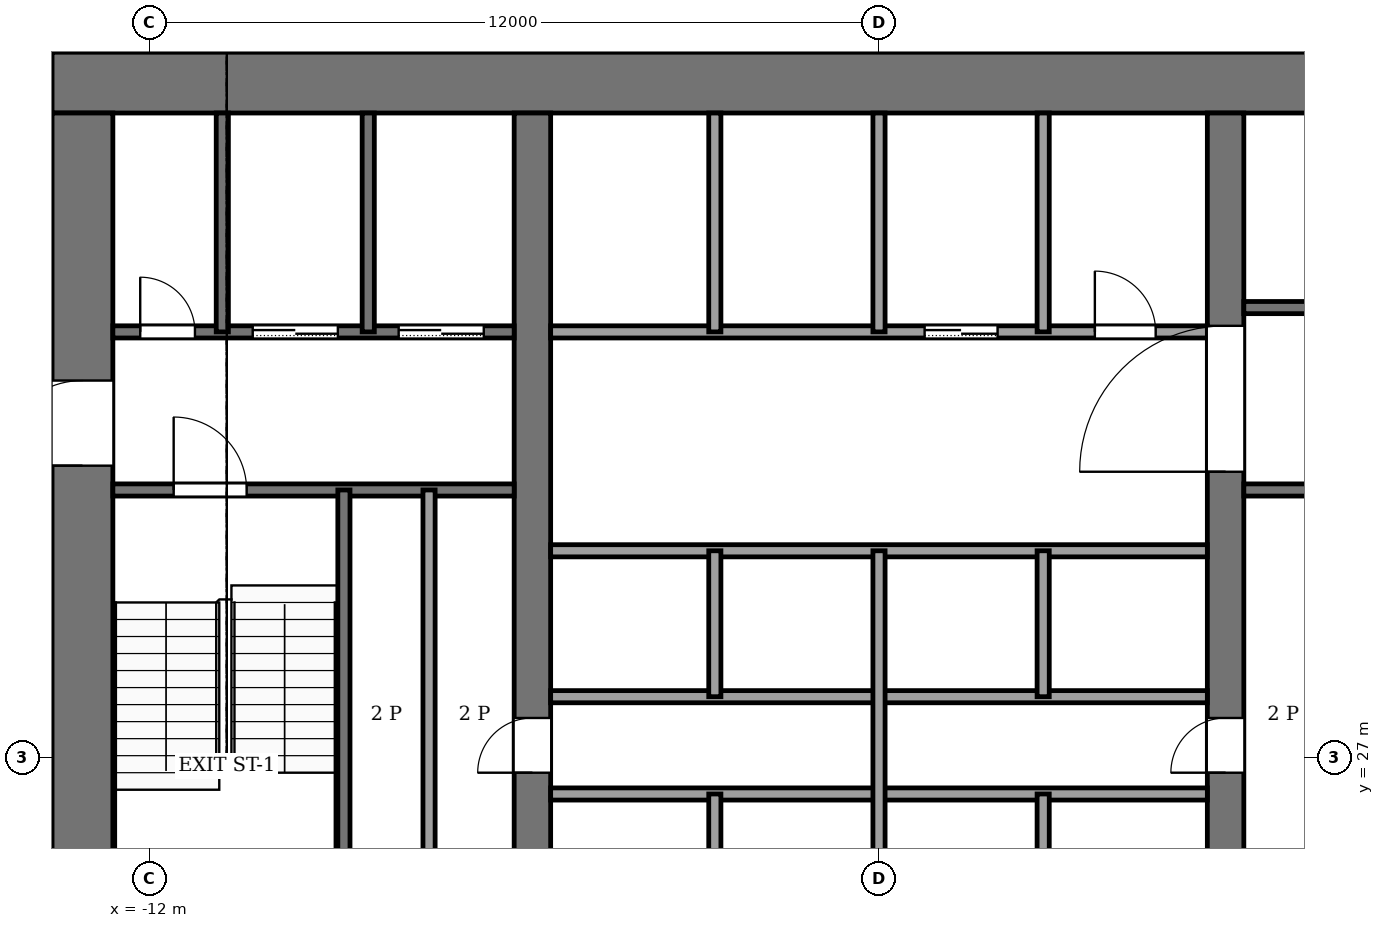
"""IFC4 building model, lengths in metres.
Left out: names, types, materials, properties, quantities, classifications, styles, units other than length and angle.
Written with IfcOpenShell. Run it as: python <this file> out.ifc"""

import sys

from ifc_helpers import new_model, si_unit, direction, frame, frame_2d, origin, place, context, subcontext, project, spatial, rectangle, extrude, element, fill, save


model = new_model("IFC4")
c1 = context("Model", 3, precision=1e-05, world=origin(), true_north=direction((0.0, 1.0)))
c2 = subcontext(c1, "Body", "Model", "MODEL_VIEW")
j1 = project(units=[si_unit("LENGTHUNIT", "METRE"), si_unit("PLANEANGLEUNIT", "RADIAN")], contexts=[c1])
p1 = place(None, origin())
s1 = spatial("IfcSite", under=j1, at=p1, CompositionType="ELEMENT")
p2 = place(p1, origin())
s2 = spatial("IfcBuilding", under=s1, at=p2, CompositionType="ELEMENT")
p3 = place(p2, frame((0.0, 0.0, 146.0)))
s3 = spatial("IfcBuildingStorey", under=s2, at=p3, CompositionType="ELEMENT", Elevation=146.0)
p4 = place(p3, frame((-13.6, 38.1, -0.13), z_axis=(0.0, 0.0, 1.0), x_axis=(1.0, 0.0, 0.0)))
e1 = element("IfcWall", 1, at=p4, inside=s3, PredefinedType="SHEAR", context=c2, shape_type="SweptSolid", body=[
    extrude(rectangle(XDim=27.2, YDim=1.0, at=frame_2d((13.6, 0.0))), origin(), (0.0, 0.0, 1.0), 4.0),
])
p5 = place(p3, frame((-13.1, 18.4, -0.13), z_axis=(0.0, 0.0, 1.0), x_axis=(0.0, 1.0, 0.0)))
e2 = element("IfcWall", 2, at=p5, inside=s3, PredefinedType="SHEAR", context=c2, shape_type="SweptSolid", body=[
    extrude(rectangle(XDim=19.2, YDim=1.0, at=frame_2d((9.6, 0.0))), origin(), (0.0, 0.0, 1.0), 4.0),
])
p6 = place(p5, frame((2.8, 0.0, 0.13)))
e3 = element("IfcOpeningElement", 3, at=p6, cuts=e2, PredefinedType="OPENING", context=c2, shape_type="SweptSolid", body=[
    extrude(rectangle(XDim=2.4, YDim=2.4, at=frame_2d((1.2, 1.2))), frame((0.0, 0.51, 0.0), z_axis=(0.0, -1.0, 0.0), x_axis=(1.0, 0.0, 0.0)), (0.0, 0.0, 1.0), 1.02),
])
p7 = place(p5, frame((13.4, 0.0, 0.13)))
e4 = element("IfcOpeningElement", 4, at=p7, cuts=e2, PredefinedType="OPENING", context=c2, shape_type="SweptSolid", body=[
    extrude(rectangle(XDim=1.4, YDim=2.2, at=frame_2d((0.7, 1.1))), frame((0.0, 0.51, 0.0), z_axis=(0.0, -1.0, 0.0), x_axis=(1.0, 0.0, 0.0)), (0.0, 0.0, 1.0), 1.02),
])
p8 = place(p3, frame((-5.7, 18.4, -0.13), z_axis=(0.0, 0.0, 1.0), x_axis=(0.0, 1.0, 0.0)))
e5 = element("IfcWall", 5, at=p8, inside=s3, PredefinedType="SHEAR", context=c2, shape_type="SweptSolid", body=[
    extrude(rectangle(XDim=19.2, YDim=0.6, at=frame_2d((9.6, 0.0))), origin(), (0.0, 0.0, 1.0), 4.0),
])
p9 = place(p8, frame((8.35, 0.0, 0.13)))
e6 = element("IfcOpeningElement", 6, at=p9, cuts=e5, PredefinedType="OPENING", context=c2, shape_type="SweptSolid", body=[
    extrude(rectangle(XDim=0.9, YDim=2.1, at=frame_2d((0.45, 1.05))), frame((0.0, 0.31, 0.0), z_axis=(0.0, -1.0, 0.0), x_axis=(1.0, 0.0, 0.0)), (0.0, 0.0, 1.0), 0.62),
])
p10 = place(p3, frame((5.7, 18.4, -0.13), z_axis=(0.0, 0.0, 1.0), x_axis=(0.0, 1.0, 0.0)))
e7 = element("IfcWall", 7, at=p10, inside=s3, PredefinedType="SHEAR", context=c2, shape_type="SweptSolid", body=[
    extrude(rectangle(XDim=19.2, YDim=0.6, at=frame_2d((9.6, 0.0))), origin(), (0.0, 0.0, 1.0), 4.0),
])
p11 = place(p10, frame((8.35, 0.0, 0.13)))
e8 = element("IfcOpeningElement", 8, at=p11, cuts=e7, PredefinedType="OPENING", context=c2, shape_type="SweptSolid", body=[
    extrude(rectangle(XDim=0.9, YDim=2.1, at=frame_2d((0.45, 1.05))), frame((0.0, 0.31, 0.0), z_axis=(0.0, -1.0, 0.0), x_axis=(1.0, 0.0, 0.0)), (0.0, 0.0, 1.0), 0.62),
])
p12 = place(p10, frame((13.3, 0.0, 0.13)))
e9 = element("IfcOpeningElement", 9, at=p12, cuts=e7, PredefinedType="OPENING", context=c2, shape_type="SweptSolid", body=[
    extrude(rectangle(XDim=2.4, YDim=2.4, at=frame_2d((1.2, 1.2))), frame((0.0, 0.31, 0.0), z_axis=(0.0, -1.0, 0.0), x_axis=(1.0, 0.0, 0.0)), (0.0, 0.0, 1.0), 0.62),
])
for number, where, z_axis, x_axis in (
    (10, (-5.4, 26.4, 0.0), (0.0, 0.0, 1.0), (1.0, 0.0, 0.0)),
    (11, (-5.4, 28.0, 0.0), (0.0, 0.0, 1.0), (1.0, 0.0, 0.0)),
    (12, (-5.4, 30.4, 0.0), (0.0, 0.0, 1.0), (1.0, 0.0, 0.0)),
):
    element("IfcWall", number, at=place(p3, frame(where, z_axis=z_axis, x_axis=x_axis)), inside=s3, PredefinedType="PARTITIONING", context=c2, shape_type="SweptSolid", body=[
        extrude(rectangle(XDim=10.8, YDim=0.2, at=frame_2d((5.4, 0.0))), origin(), (0.0, 0.0, 1.0), 3.87),
    ])
p13 = place(p3, frame((-12.6, 31.4, 0.0), z_axis=(0.0, 0.0, 1.0), x_axis=(1.0, 0.0, 0.0)))
e13 = element("IfcWall", 13, at=p13, inside=s3, PredefinedType="PARTITIONING", context=c2, shape_type="SweptSolid", body=[
    extrude(rectangle(XDim=6.6, YDim=0.2, at=frame_2d((3.3, 0.0))), origin(), (0.0, 0.0, 1.0), 3.87),
])
p14 = place(p13, frame((1.0, 0.0, 0.0)))
e14 = element("IfcOpeningElement", 14, at=p14, cuts=e13, PredefinedType="OPENING", context=c2, shape_type="SweptSolid", body=[
    extrude(rectangle(XDim=1.2, YDim=2.2, at=frame_2d((0.6, 1.1))), frame((0.0, 0.11, 0.0), z_axis=(0.0, -1.0, 0.0), x_axis=(1.0, 0.0, 0.0)), (0.0, 0.0, 1.0), 0.22),
])
p15 = place(p3, frame((6.0, 31.4, 0.0), z_axis=(0.0, 0.0, 1.0), x_axis=(1.0, 0.0, 0.0)))
e15 = element("IfcWall", 15, at=p15, inside=s3, PredefinedType="PARTITIONING", context=c2, shape_type="SweptSolid", body=[
    extrude(rectangle(XDim=6.6, YDim=0.2, at=frame_2d((3.3, 0.0))), origin(), (0.0, 0.0, 1.0), 3.87),
])
p16 = place(p3, frame((-12.6, 34.0, 0.0), z_axis=(0.0, 0.0, 1.0), x_axis=(1.0, 0.0, 0.0)))
e16 = element("IfcWall", 16, at=p16, inside=s3, PredefinedType="PARTITIONING", context=c2, shape_type="SweptSolid", body=[
    extrude(rectangle(XDim=6.6, YDim=0.2, at=frame_2d((3.3, 0.0))), origin(), (0.0, 0.0, 1.0), 3.87),
])
p17 = place(p16, frame((4.7, 0.0, 0.0)))
e17 = element("IfcOpeningElement", 17, at=p17, cuts=e16, PredefinedType="OPENING", context=c2, shape_type="SweptSolid", body=[
    extrude(rectangle(XDim=1.4, YDim=2.2, at=frame_2d((0.7, 1.1))), frame((0.0, 0.11, 0.0), z_axis=(0.0, -1.0, 0.0), x_axis=(1.0, 0.0, 0.0)), (0.0, 0.0, 1.0), 0.22),
])
p18 = place(p16, frame((2.3, 0.0, 0.0)))
e18 = element("IfcOpeningElement", 18, at=p18, cuts=e16, PredefinedType="OPENING", context=c2, shape_type="SweptSolid", body=[
    extrude(rectangle(XDim=1.4, YDim=2.2, at=frame_2d((0.7, 1.1))), frame((0.0, 0.11, 0.0), z_axis=(0.0, -1.0, 0.0), x_axis=(1.0, 0.0, 0.0)), (0.0, 0.0, 1.0), 0.22),
])
p19 = place(p16, frame((0.45, 0.0, 0.0)))
e19 = element("IfcOpeningElement", 19, at=p19, cuts=e16, PredefinedType="OPENING", context=c2, shape_type="SweptSolid", body=[
    extrude(rectangle(XDim=0.9, YDim=2.1, at=frame_2d((0.45, 1.05))), frame((0.0, 0.11, 0.0), z_axis=(0.0, -1.0, 0.0), x_axis=(1.0, 0.0, 0.0)), (0.0, 0.0, 1.0), 0.22),
])
p20 = place(p3, frame((-5.4, 34.0, 0.0), z_axis=(0.0, 0.0, 1.0), x_axis=(1.0, 0.0, 0.0)))
e20 = element("IfcWall", 20, at=p20, inside=s3, PredefinedType="PARTITIONING", context=c2, shape_type="SweptSolid", body=[
    extrude(rectangle(XDim=10.8, YDim=0.2, at=frame_2d((5.4, 0.0))), origin(), (0.0, 0.0, 1.0), 3.87),
])
p21 = place(p20, frame((6.15, 0.0, 0.0)))
e21 = element("IfcOpeningElement", 21, at=p21, cuts=e20, PredefinedType="OPENING", context=c2, shape_type="SweptSolid", body=[
    extrude(rectangle(XDim=1.2, YDim=2.2, at=frame_2d((0.6, 1.1))), frame((0.0, 0.11, 0.0), z_axis=(0.0, -1.0, 0.0), x_axis=(1.0, 0.0, 0.0)), (0.0, 0.0, 1.0), 0.22),
])
p22 = place(p20, frame((8.95, 0.0, 0.0)))
e22 = element("IfcOpeningElement", 22, at=p22, cuts=e20, PredefinedType="OPENING", context=c2, shape_type="SweptSolid", body=[
    extrude(rectangle(XDim=1.0, YDim=2.1, at=frame_2d((0.5, 1.05))), frame((0.0, 0.11, 0.0), z_axis=(0.0, -1.0, 0.0), x_axis=(1.0, 0.0, 0.0)), (0.0, 0.0, 1.0), 0.22),
])
p23 = place(p3, frame((6.0, 34.4, 0.0), z_axis=(0.0, 0.0, 1.0), x_axis=(1.0, 0.0, 0.0)))
e23 = element("IfcWall", 23, at=p23, inside=s3, PredefinedType="PARTITIONING", context=c2, shape_type="SweptSolid", body=[
    extrude(rectangle(XDim=6.6, YDim=0.2, at=frame_2d((3.3, 0.0))), origin(), (0.0, 0.0, 1.0), 3.87),
])
p24 = place(p23, frame((4.8, 0.0, 0.0)))
e24 = element("IfcOpeningElement", 24, at=p24, cuts=e23, PredefinedType="OPENING", context=c2, shape_type="SweptSolid", body=[
    extrude(rectangle(XDim=1.2, YDim=2.2, at=frame_2d((0.6, 1.1))), frame((0.0, 0.11, 0.0), z_axis=(0.0, -1.0, 0.0), x_axis=(1.0, 0.0, 0.0)), (0.0, 0.0, 1.0), 0.22),
])
p25 = place(p3, frame((-10.8, 34.0, 0.0), z_axis=(0.0, 0.0, 1.0), x_axis=(0.0, 1.0, 0.0)))
e25 = element("IfcWall", 25, at=p25, inside=s3, PredefinedType="PARTITIONING", context=c2, shape_type="SweptSolid", body=[
    extrude(rectangle(XDim=3.6, YDim=0.2, at=frame_2d((1.8, 0.0))), origin(), (0.0, 0.0, 1.0), 3.87),
])
p26 = place(p3, frame((-8.8, 24.0, 0.0), z_axis=(0.0, 0.0, 1.0), x_axis=(0.0, 1.0, 0.0)))
e26 = element("IfcWall", 26, at=p26, inside=s3, PredefinedType="PARTITIONING", context=c2, shape_type="SweptSolid", body=[
    extrude(rectangle(XDim=7.4, YDim=0.2, at=frame_2d((3.7, 0.0))), origin(), (0.0, 0.0, 1.0), 3.87),
])
p27 = place(p3, frame((-8.4, 34.0, 0.0), z_axis=(0.0, 0.0, 1.0), x_axis=(0.0, 1.0, 0.0)))
e27 = element("IfcWall", 27, at=p27, inside=s3, PredefinedType="PARTITIONING", context=c2, shape_type="SweptSolid", body=[
    extrude(rectangle(XDim=3.6, YDim=0.2, at=frame_2d((1.8, 0.0))), origin(), (0.0, 0.0, 1.0), 3.87),
])
p28 = place(p3, frame((-7.4, 24.0, 0.0), z_axis=(0.0, 0.0, 1.0), x_axis=(0.0, 1.0, 0.0)))
e28 = element("IfcWall", 28, at=p28, inside=s3, PredefinedType="PARTITIONING", context=c2, shape_type="SweptSolid", body=[
    extrude(rectangle(XDim=7.4, YDim=0.2, at=frame_2d((3.7, 0.0))), origin(), (0.0, 0.0, 1.0), 3.87),
])
for number, where, z_axis, x_axis in (
    (29, (-2.7, 24.0, 0.0), (0.0, 0.0, 1.0), (0.0, 1.0, 0.0)),
    (30, (-2.7, 28.0, 0.0), (0.0, 0.0, 1.0), (0.0, 1.0, 0.0)),
):
    element("IfcWall", number, at=place(p3, frame(where, z_axis=z_axis, x_axis=x_axis)), inside=s3, PredefinedType="PARTITIONING", context=c2, shape_type="SweptSolid", body=[
        extrude(rectangle(XDim=2.4, YDim=0.2, at=frame_2d((1.2, 0.0))), origin(), (0.0, 0.0, 1.0), 3.87),
    ])
p29 = place(p3, frame((-2.7, 34.0, 0.0), z_axis=(0.0, 0.0, 1.0), x_axis=(0.0, 1.0, 0.0)))
e31 = element("IfcWall", 31, at=p29, inside=s3, PredefinedType="PARTITIONING", context=c2, shape_type="SweptSolid", body=[
    extrude(rectangle(XDim=3.6, YDim=0.2, at=frame_2d((1.8, 0.0))), origin(), (0.0, 0.0, 1.0), 3.87),
])
p30 = place(p3, frame((0.0, 24.0, 0.0), z_axis=(0.0, 0.0, 1.0), x_axis=(0.0, 1.0, 0.0)))
e32 = element("IfcWall", 32, at=p30, inside=s3, PredefinedType="PARTITIONING", context=c2, shape_type="SweptSolid", body=[
    extrude(rectangle(XDim=6.4, YDim=0.2, at=frame_2d((3.2, 0.0))), origin(), (0.0, 0.0, 1.0), 3.87),
])
p31 = place(p3, frame((0.0, 34.0, 0.0), z_axis=(0.0, 0.0, 1.0), x_axis=(0.0, 1.0, 0.0)))
e33 = element("IfcWall", 33, at=p31, inside=s3, PredefinedType="PARTITIONING", context=c2, shape_type="SweptSolid", body=[
    extrude(rectangle(XDim=3.6, YDim=0.2, at=frame_2d((1.8, 0.0))), origin(), (0.0, 0.0, 1.0), 3.87),
])
for number, where, z_axis, x_axis in (
    (34, (2.7, 24.0, 0.0), (0.0, 0.0, 1.0), (0.0, 1.0, 0.0)),
    (35, (2.7, 28.0, 0.0), (0.0, 0.0, 1.0), (0.0, 1.0, 0.0)),
):
    element("IfcWall", number, at=place(p3, frame(where, z_axis=z_axis, x_axis=x_axis)), inside=s3, PredefinedType="PARTITIONING", context=c2, shape_type="SweptSolid", body=[
        extrude(rectangle(XDim=2.4, YDim=0.2, at=frame_2d((1.2, 0.0))), origin(), (0.0, 0.0, 1.0), 3.87),
    ])
p32 = place(p3, frame((2.7, 34.0, 0.0), z_axis=(0.0, 0.0, 1.0), x_axis=(0.0, 1.0, 0.0)))
e36 = element("IfcWall", 36, at=p32, inside=s3, PredefinedType="PARTITIONING", context=c2, shape_type="SweptSolid", body=[
    extrude(rectangle(XDim=3.6, YDim=0.2, at=frame_2d((1.8, 0.0))), origin(), (0.0, 0.0, 1.0), 3.87),
])
p33 = place(p21, origin())
e37 = element("IfcDoor", 37, at=p33, inside=s3, OperationType="SLIDING_TO_LEFT", PredefinedType="DOOR", context=c2, shape_type="SweptSolid", body=[
    extrude(rectangle(XDim=1.2, YDim=2.2, at=frame_2d((0.6, 1.1))), frame((0.0, 0.025, 0.0), z_axis=(0.0, -1.0, 0.0), x_axis=(1.0, 0.0, 0.0)), (0.0, 0.0, 1.0), 0.05),
])
fill(e21, e37)
p34 = place(p17, origin())
e38 = element("IfcDoor", 38, at=p34, inside=s3, OperationType="SLIDING_TO_LEFT", PredefinedType="DOOR", context=c2, shape_type="SweptSolid", body=[
    extrude(rectangle(XDim=1.4, YDim=2.2, at=frame_2d((0.7, 1.1))), frame((0.0, 0.025, 0.0), z_axis=(0.0, -1.0, 0.0), x_axis=(1.0, 0.0, 0.0)), (0.0, 0.0, 1.0), 0.05),
])
fill(e17, e38)
p35 = place(p18, origin())
e39 = element("IfcDoor", 39, at=p35, inside=s3, OperationType="SLIDING_TO_LEFT", PredefinedType="DOOR", context=c2, shape_type="SweptSolid", body=[
    extrude(rectangle(XDim=1.4, YDim=2.2, at=frame_2d((0.7, 1.1))), frame((0.0, 0.025, 0.0), z_axis=(0.0, -1.0, 0.0), x_axis=(1.0, 0.0, 0.0)), (0.0, 0.0, 1.0), 0.05),
])
fill(e18, e39)
p36 = place(p19, origin())
e40 = element("IfcDoor", 40, at=p36, inside=s3, OperationType="SINGLE_SWING_RIGHT", PredefinedType="DOOR", context=c2, shape_type="SweptSolid", body=[
    extrude(rectangle(XDim=0.9, YDim=2.1, at=frame_2d((0.45, 1.05))), frame((0.0, 0.025, 0.0), z_axis=(0.0, -1.0, 0.0), x_axis=(1.0, 0.0, 0.0)), (0.0, 0.0, 1.0), 0.05),
])
fill(e19, e40)
p37 = place(p22, origin())
e41 = element("IfcDoor", 41, at=p37, inside=s3, OperationType="SINGLE_SWING_LEFT", PredefinedType="DOOR", context=c2, shape_type="SweptSolid", body=[
    extrude(rectangle(XDim=1.0, YDim=2.1, at=frame_2d((0.5, 1.05))), frame((0.0, 0.025, 0.0), z_axis=(0.0, -1.0, 0.0), x_axis=(1.0, 0.0, 0.0)), (0.0, 0.0, 1.0), 0.05),
])
fill(e22, e41)
p38 = place(p9, origin())
e42 = element("IfcDoor", 42, at=p38, inside=s3, OperationType="SINGLE_SWING_LEFT", PredefinedType="DOOR", context=c2, shape_type="SweptSolid", body=[
    extrude(rectangle(XDim=0.9, YDim=2.1, at=frame_2d((0.45, 1.05))), frame((0.0, 0.025, 0.0), z_axis=(0.0, -1.0, 0.0), x_axis=(1.0, 0.0, 0.0)), (0.0, 0.0, 1.0), 0.05),
])
fill(e6, e42)
p39 = place(p11, origin())
e43 = element("IfcDoor", 43, at=p39, inside=s3, OperationType="SINGLE_SWING_RIGHT", PredefinedType="DOOR", context=c2, shape_type="SweptSolid", body=[
    extrude(rectangle(XDim=0.9, YDim=2.1, at=frame_2d((0.45, 1.05))), frame((0.0, 0.025, 0.0), z_axis=(0.0, -1.0, 0.0), x_axis=(1.0, 0.0, 0.0)), (0.0, 0.0, 1.0), 0.05),
])
fill(e8, e43)
p40 = place(p14, origin())
e44 = element("IfcDoor", 44, at=p40, inside=s3, OperationType="SINGLE_SWING_RIGHT", PredefinedType="DOOR", context=c2, shape_type="SweptSolid", body=[
    extrude(rectangle(XDim=1.2, YDim=2.2, at=frame_2d((0.6, 1.1))), frame((0.0, 0.025, 0.0), z_axis=(0.0, -1.0, 0.0), x_axis=(1.0, 0.0, 0.0)), (0.0, 0.0, 1.0), 0.05),
])
fill(e14, e44)
p41 = place(p12, origin())
e45 = element("IfcDoor", 45, at=p41, inside=s3, OperationType="DOUBLE_DOOR_SINGLE_SWING", PredefinedType="DOOR", context=c2, shape_type="SweptSolid", body=[
    extrude(rectangle(XDim=2.4, YDim=2.4, at=frame_2d((1.2, 1.2))), frame((0.0, 0.025, 0.0), z_axis=(0.0, -1.0, 0.0), x_axis=(1.0, 0.0, 0.0)), (0.0, 0.0, 1.0), 0.05),
])
fill(e9, e45)
p42 = place(p7, origin())
e46 = element("IfcDoor", 46, at=p42, inside=s3, OperationType="SINGLE_SWING_RIGHT", PredefinedType="DOOR", context=c2, shape_type="SweptSolid", body=[
    extrude(rectangle(XDim=1.4, YDim=2.2, at=frame_2d((0.7, 1.1))), frame((0.0, 0.025, 0.0), z_axis=(0.0, -1.0, 0.0), x_axis=(1.0, 0.0, 0.0)), (0.0, 0.0, 1.0), 0.05),
])
fill(e4, e46)
save(model, sys.argv[1])
